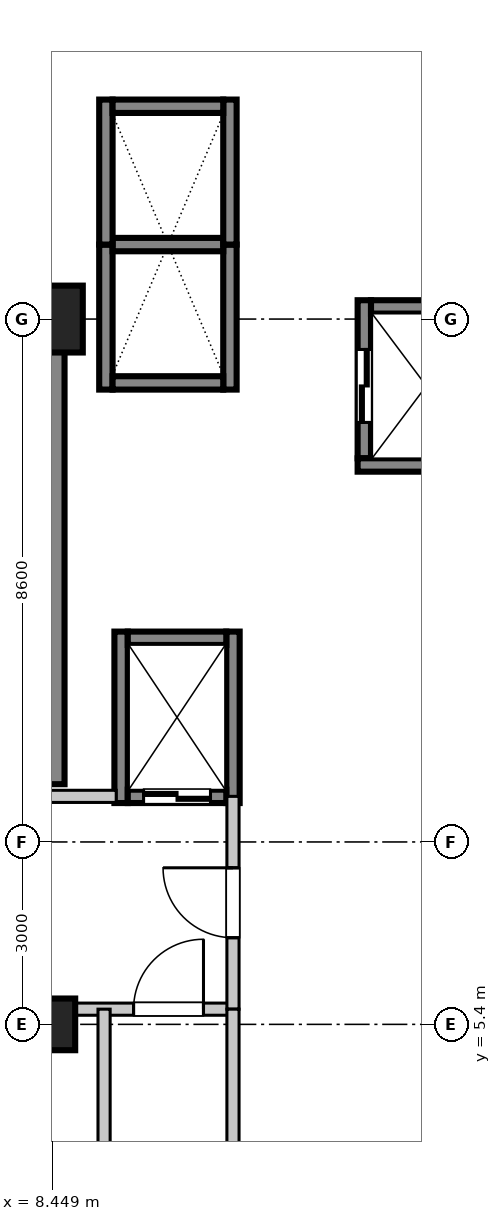
"""IFC4 building model, lengths in metres.
Left out: names, types, materials, properties, quantities, classifications, styles, units other than length and angle.
Written with IfcOpenShell. Run it as: python <this file> out.ifc"""

import sys

from ifc_helpers import new_model, si_unit, direction, frame, frame_2d, origin, origin_2d, place, context, subcontext, project, spatial, rectangle, extrude, source, transform, mapped, element, fill, save


model = new_model("IFC4")
c1 = context("Model", 3, precision=1e-05, world=origin(), true_north=direction((0.0, 1.0)))
c2 = subcontext(c1, "Body", "Model", "MODEL_VIEW")
j1 = project(units=[si_unit("LENGTHUNIT", "METRE"), si_unit("PLANEANGLEUNIT", "RADIAN")], contexts=[c1])
p1 = place(None, origin())
s1 = spatial("IfcSite", under=j1, at=p1, CompositionType="ELEMENT")
p2 = place(p1, origin())
s2 = spatial("IfcBuilding", under=s1, at=p2, CompositionType="ELEMENT")
p3 = place(p2, frame((0.0, 0.0, 200.1)))
s3 = spatial("IfcBuildingStorey", under=s2, at=p3, CompositionType="ELEMENT", Elevation=200.1)
m1 = source(origin(), c2, "Body", "SweptSolid", [
    extrude(rectangle(XDim=0.85, YDim=0.85, at=origin_2d()), origin(), (0.0, 0.0, 1.0), 4.755),
])
p4 = place(p3, frame((8.4, 5.4, 0.0), z_axis=(0.0, 0.0, 1.0), x_axis=(1.0, 0.0, 0.0)))
e1 = element("IfcColumn", 1, at=p4, inside=s3, PredefinedType="PILASTER", context=c2, shape_type="MappedRepresentation", body=[
    mapped(m1, transform((0.0, 0.0, 0.0), scale=1.0)),
])
m2 = source(origin(), c2, "Body", "SweptSolid", [
    extrude(rectangle(XDim=1.1, YDim=1.1, at=origin_2d()), origin(), (0.0, 0.0, 1.0), 4.755),
])
p5 = place(p3, frame((8.4, 17.0, 0.0), z_axis=(0.0, 0.0, 1.0), x_axis=(1.0, 0.0, 0.0)))
e2 = element("IfcColumn", 2, at=p5, inside=s3, PredefinedType="COLUMN", context=c2, shape_type="MappedRepresentation", body=[
    mapped(m2, transform((0.0, 0.0, 0.0), scale=1.0)),
])
m3 = source(origin(), c2, "Body", "SweptSolid", [
    extrude(rectangle(XDim=7.65, YDim=0.5, at=frame_2d((3.825, 0.0))), origin(), (0.0, 0.0, 1.0), 4.51),
])
p6 = place(p3, frame((8.4, 9.35, 0.0), z_axis=(0.0, 0.0, 1.0), x_axis=(0.0, 1.0, 0.0)))
e3 = element("IfcWall", 3, at=p6, inside=s3, PredefinedType="SHEAR", context=c2, shape_type="MappedRepresentation", body=[
    mapped(m3, transform((0.0, 0.0, 0.0), scale=1.0)),
])
m4 = source(origin(), c2, "Body", "SweptSolid", [
    extrude(rectangle(XDim=2.385, YDim=0.22, at=frame_2d((1.192, 0.0))), origin(), (0.0, 0.0, 1.0), 4.51),
])
for number, where, z_axis, x_axis in (
    (4, (9.33, 15.84, 0.0), (0.0, 0.0, 1.0), (0.0, 1.0, 0.0)),
    (5, (11.37, 15.84, 0.0), (0.0, 0.0, 1.0), (0.0, 1.0, 0.0)),
):
    element("IfcWall", number, at=place(p3, frame(where, z_axis=z_axis, x_axis=x_axis)), inside=s3, PredefinedType="SHEAR", context=c2, shape_type="MappedRepresentation", body=[
        mapped(m4, transform((0.0, 0.0, 0.0), scale=1.0)),
    ])
m5 = source(origin(), c2, "Body", "SweptSolid", [
    extrude(rectangle(XDim=1.82, YDim=0.22, at=frame_2d((0.91, 0.0))), origin(), (0.0, 0.0, 1.0), 4.51),
])
p7 = place(p3, frame((9.44, 15.95, 0.0), z_axis=(0.0, 0.0, 1.0), x_axis=(1.0, 0.0, 0.0)))
e6 = element("IfcWall", 6, at=p7, inside=s3, PredefinedType="SHEAR", context=c2, shape_type="MappedRepresentation", body=[
    mapped(m5, transform((0.0, 0.0, 0.0), scale=1.0)),
])
m6 = source(origin(), c2, "Body", "SweptSolid", [
    extrude(rectangle(XDim=1.82, YDim=0.22, at=frame_2d((0.91, 0.0))), origin(), (0.0, 0.0, 1.0), 4.8),
])
p8 = place(p3, frame((9.44, 18.225, 0.0), z_axis=(0.0, 0.0, 1.0), x_axis=(1.0, 0.0, 0.0)))
e7 = element("IfcWall", 7, at=p8, inside=s3, PredefinedType="SHEAR", context=c2, shape_type="MappedRepresentation", body=[
    mapped(m6, transform((0.0, 0.0, 0.0), scale=1.0)),
])
for number, where, z_axis, x_axis in (
    (8, (9.33, 18.225, 0.0), (0.0, 0.0, 1.0), (0.0, 1.0, 0.0)),
    (9, (11.37, 18.225, 0.0), (0.0, 0.0, 1.0), (0.0, 1.0, 0.0)),
):
    element("IfcWall", number, at=place(p3, frame(where, z_axis=z_axis, x_axis=x_axis)), inside=s3, PredefinedType="SHEAR", context=c2, shape_type="MappedRepresentation", body=[
        mapped(m4, transform((0.0, 0.0, 0.0), scale=1.0)),
    ])
p9 = place(p3, frame((9.44, 20.5, 0.0), z_axis=(0.0, 0.0, 1.0), x_axis=(1.0, 0.0, 0.0)))
e10 = element("IfcWall", 10, at=p9, inside=s3, PredefinedType="SHEAR", context=c2, shape_type="MappedRepresentation", body=[
    mapped(m5, transform((0.0, 0.0, 0.0), scale=1.0)),
])
m7 = source(origin(), c2, "Body", "SweptSolid", [
    extrude(rectangle(XDim=2.82, YDim=0.22, at=frame_2d((1.41, 0.0))), origin(), (0.0, 0.0, 1.0), 4.51),
])
for number, where, z_axis, x_axis in (
    (11, (9.58, 9.04, 0.0), (0.0, 0.0, 1.0), (0.0, 1.0, 0.0)),
    (12, (11.42, 9.04, 0.0), (0.0, 0.0, 1.0), (0.0, 1.0, 0.0)),
):
    element("IfcWall", number, at=place(p3, frame(where, z_axis=z_axis, x_axis=x_axis)), inside=s3, PredefinedType="SHEAR", context=c2, shape_type="MappedRepresentation", body=[
        mapped(m7, transform((0.0, 0.0, 0.0), scale=1.0)),
    ])
m8 = source(origin(), c2, "Body", "SweptSolid", [
    extrude(rectangle(XDim=1.62, YDim=0.22, at=frame_2d((0.81, 0.0))), origin(), (0.0, 0.0, 1.0), 4.51),
])
p10 = place(p3, frame((9.69, 9.15, 0.0), z_axis=(0.0, 0.0, 1.0), x_axis=(1.0, 0.0, 0.0)))
e13 = element("IfcWall", 13, at=p10, inside=s3, PredefinedType="SHEAR", context=c2, shape_type="MappedRepresentation", body=[
    mapped(m8, transform((0.0, 0.0, 0.0), scale=1.0)),
])
p11 = place(p10, frame((0.26, 0.0, 0.0)))
e14 = element("IfcOpeningElement", 14, at=p11, cuts=e13, PredefinedType="OPENING", context=c2, shape_type="SweptSolid", body=[
    extrude(rectangle(XDim=1.1, YDim=2.2, at=frame_2d((0.55, 1.1))), frame((0.0, 0.12, 0.0), z_axis=(0.0, -1.0, 0.0), x_axis=(1.0, 0.0, 0.0)), (0.0, 0.0, 1.0), 0.24),
])
p12 = place(p3, frame((9.69, 11.75, 0.0), z_axis=(0.0, 0.0, 1.0), x_axis=(1.0, 0.0, 0.0)))
e15 = element("IfcWall", 15, at=p12, inside=s3, PredefinedType="SHEAR", context=c2, shape_type="MappedRepresentation", body=[
    mapped(m8, transform((0.0, 0.0, 0.0), scale=1.0)),
])
m9 = source(origin(), c2, "Body", "SweptSolid", [
    extrude(rectangle(XDim=2.6, YDim=0.22, at=frame_2d((1.3, 0.0))), origin(), (0.0, 0.0, 1.0), 4.51),
])
p13 = place(p3, frame((13.58, 14.71, 0.0), z_axis=(0.0, 0.0, 1.0), x_axis=(0.0, 1.0, 0.0)))
e16 = element("IfcWall", 16, at=p13, inside=s3, PredefinedType="SHEAR", context=c2, shape_type="MappedRepresentation", body=[
    mapped(m9, transform((0.0, 0.0, 0.0), scale=1.0)),
])
p14 = place(p13, frame((0.59, 0.0, 0.0)))
e17 = element("IfcOpeningElement", 17, at=p14, cuts=e16, PredefinedType="OPENING", context=c2, shape_type="SweptSolid", body=[
    extrude(rectangle(XDim=1.2, YDim=2.2, at=frame_2d((0.6, 1.1))), frame((0.0, 0.12, 0.0), z_axis=(0.0, -1.0, 0.0), x_axis=(1.0, 0.0, 0.0)), (0.0, 0.0, 1.0), 0.24),
])
m10 = source(origin(), c2, "Body", "SweptSolid", [
    extrude(rectangle(XDim=2.33, YDim=0.22, at=frame_2d((1.165, 0.0))), origin(), (0.0, 0.0, 1.0), 4.51),
])
p15 = place(p3, frame((13.47, 14.6, 0.0), z_axis=(0.0, 0.0, 1.0), x_axis=(1.0, 0.0, 0.0)))
e18 = element("IfcWall", 18, at=p15, inside=s3, PredefinedType="SHEAR", context=c2, shape_type="MappedRepresentation", body=[
    mapped(m10, transform((0.0, 0.0, 0.0), scale=1.0)),
])
p16 = place(p3, frame((13.69, 17.2, 0.0), z_axis=(0.0, 0.0, 1.0), x_axis=(1.0, 0.0, 0.0)))
e19 = element("IfcWall", 19, at=p16, inside=s3, PredefinedType="SHEAR", context=c2, shape_type="MappedRepresentation", body=[
    mapped(m5, transform((0.0, 0.0, 0.0), scale=1.0)),
])
m11 = source(origin(), c2, "Body", "SweptSolid", [
    extrude(rectangle(XDim=3.82, YDim=0.2, at=frame_2d((1.91, 0.0))), origin(), (0.0, 0.0, 1.0), 3.4),
])
p17 = place(p3, frame((7.6, 5.65, 0.0), z_axis=(0.0, 0.0, 1.0), x_axis=(1.0, 0.0, 0.0)))
e20 = element("IfcWall", 20, at=p17, inside=s3, PredefinedType="PARTITIONING", context=c2, shape_type="MappedRepresentation", body=[
    mapped(m11, transform((0.0, 0.0, 0.0), scale=1.0)),
])
p18 = place(p17, frame((2.185, 0.0, 0.0)))
e21 = element("IfcOpeningElement", 21, at=p18, cuts=e20, PredefinedType="OPENING", context=c2, shape_type="SweptSolid", body=[
    extrude(rectangle(XDim=1.15, YDim=2.15, at=frame_2d((0.575, 1.075))), frame((0.0, 0.11, 0.0), z_axis=(0.0, -1.0, 0.0), x_axis=(1.0, 0.0, 0.0)), (0.0, 0.0, 1.0), 0.22),
])
m12 = source(origin(), c2, "Body", "SweptSolid", [
    extrude(rectangle(XDim=1.9, YDim=0.2, at=frame_2d((0.95, 0.0))), origin(), (0.0, 0.0, 1.0), 3.4),
])
p19 = place(p3, frame((7.6, 9.15, 0.0), z_axis=(0.0, 0.0, 1.0), x_axis=(1.0, 0.0, 0.0)))
e22 = element("IfcWall", 22, at=p19, inside=s3, PredefinedType="PARTITIONING", context=c2, shape_type="MappedRepresentation", body=[
    mapped(m12, transform((0.0, 0.0, 0.0), scale=1.0)),
])
m13 = source(origin(), c2, "Body", "SweptSolid", [
    extrude(rectangle(XDim=3.5, YDim=0.2, at=frame_2d((1.75, 0.0))), origin(), (0.0, 0.0, 1.0), 3.4),
])
p20 = place(p3, frame((11.42, 5.65, 0.0), z_axis=(0.0, 0.0, 1.0), x_axis=(0.0, 1.0, 0.0)))
e23 = element("IfcWall", 23, at=p20, inside=s3, PredefinedType="PARTITIONING", context=c2, shape_type="MappedRepresentation", body=[
    mapped(m13, transform((0.0, 0.0, 0.0), scale=1.0)),
])
p21 = place(p20, frame((1.175, 0.0, 0.0)))
e24 = element("IfcOpeningElement", 24, at=p21, cuts=e23, PredefinedType="OPENING", context=c2, shape_type="SweptSolid", body=[
    extrude(rectangle(XDim=1.15, YDim=2.15, at=frame_2d((0.575, 1.075))), frame((0.0, 0.11, 0.0), z_axis=(0.0, -1.0, 0.0), x_axis=(1.0, 0.0, 0.0)), (0.0, 0.0, 1.0), 0.22),
])
m14 = source(origin(), c2, "Body", "SweptSolid", [
    extrude(rectangle(XDim=3.05, YDim=0.2, at=frame_2d((1.525, 0.0))), origin(), (0.0, 0.0, 1.0), 3.4),
])
for number, where, z_axis, x_axis in (
    (25, (9.3, 2.6, 0.0), (0.0, 0.0, 1.0), (0.0, 1.0, 0.0)),
    (26, (11.42, 2.6, 0.0), (0.0, 0.0, 1.0), (0.0, 1.0, 0.0)),
):
    element("IfcWall", number, at=place(p3, frame(where, z_axis=z_axis, x_axis=x_axis)), inside=s3, PredefinedType="PARTITIONING", context=c2, shape_type="MappedRepresentation", body=[
        mapped(m14, transform((0.0, 0.0, 0.0), scale=1.0)),
    ])
m15 = source(origin(), c2, "Body", "SweptSolid", [
    extrude(rectangle(XDim=1.1, YDim=2.2, at=frame_2d((0.55, 1.1))), frame((0.0, 0.025, 0.0), z_axis=(0.0, -1.0, 0.0), x_axis=(1.0, 0.0, 0.0)), (0.0, 0.0, 1.0), 0.05),
])
p22 = place(p11, frame((1.1, 0.0, 0.0), z_axis=(0.0, 0.0, 1.0), x_axis=(-1.0, 0.0, 0.0)))
e27 = element("IfcDoor", 27, at=p22, inside=s3, OperationType="DOUBLE_DOOR_SLIDING", PredefinedType="DOOR", context=c2, shape_type="MappedRepresentation", body=[
    mapped(m15, transform((0.0, 0.0, 0.0), scale=1.0)),
])
fill(e14, e27)
m16 = source(origin(), c2, "Body", "SweptSolid", [
    extrude(rectangle(XDim=1.2, YDim=2.2, at=frame_2d((0.6, 1.1))), frame((0.0, 0.025, 0.0), z_axis=(0.0, -1.0, 0.0), x_axis=(1.0, 0.0, 0.0)), (0.0, 0.0, 1.0), 0.05),
])
p23 = place(p14, origin())
e28 = element("IfcDoor", 28, at=p23, inside=s3, OperationType="DOUBLE_DOOR_SLIDING", PredefinedType="DOOR", context=c2, shape_type="MappedRepresentation", body=[
    mapped(m16, transform((0.0, 0.0, 0.0), scale=1.0)),
])
fill(e17, e28)
m17 = source(origin(), c2, "Body", "SweptSolid", [
    extrude(rectangle(XDim=1.15, YDim=2.15, at=frame_2d((0.575, 1.075))), frame((0.0, 0.025, 0.0), z_axis=(0.0, -1.0, 0.0), x_axis=(1.0, 0.0, 0.0)), (0.0, 0.0, 1.0), 0.05),
])
p24 = place(p21, frame((1.15, 0.0, 0.0), z_axis=(0.0, 0.0, 1.0), x_axis=(-1.0, 0.0, 0.0)))
e29 = element("IfcDoor", 29, at=p24, inside=s3, OperationType="SINGLE_SWING_RIGHT", PredefinedType="DOOR", context=c2, shape_type="MappedRepresentation", body=[
    mapped(m17, transform((0.0, 0.0, 0.0), scale=1.0)),
])
fill(e24, e29)
p25 = place(p18, frame((1.15, 0.0, 0.0), z_axis=(0.0, 0.0, 1.0), x_axis=(-1.0, 0.0, 0.0)))
e30 = element("IfcDoor", 30, at=p25, inside=s3, OperationType="SINGLE_SWING_RIGHT", PredefinedType="DOOR", context=c2, shape_type="MappedRepresentation", body=[
    mapped(m17, transform((0.0, 0.0, 0.0), scale=1.0)),
])
fill(e21, e30)
save(model, sys.argv[1])
